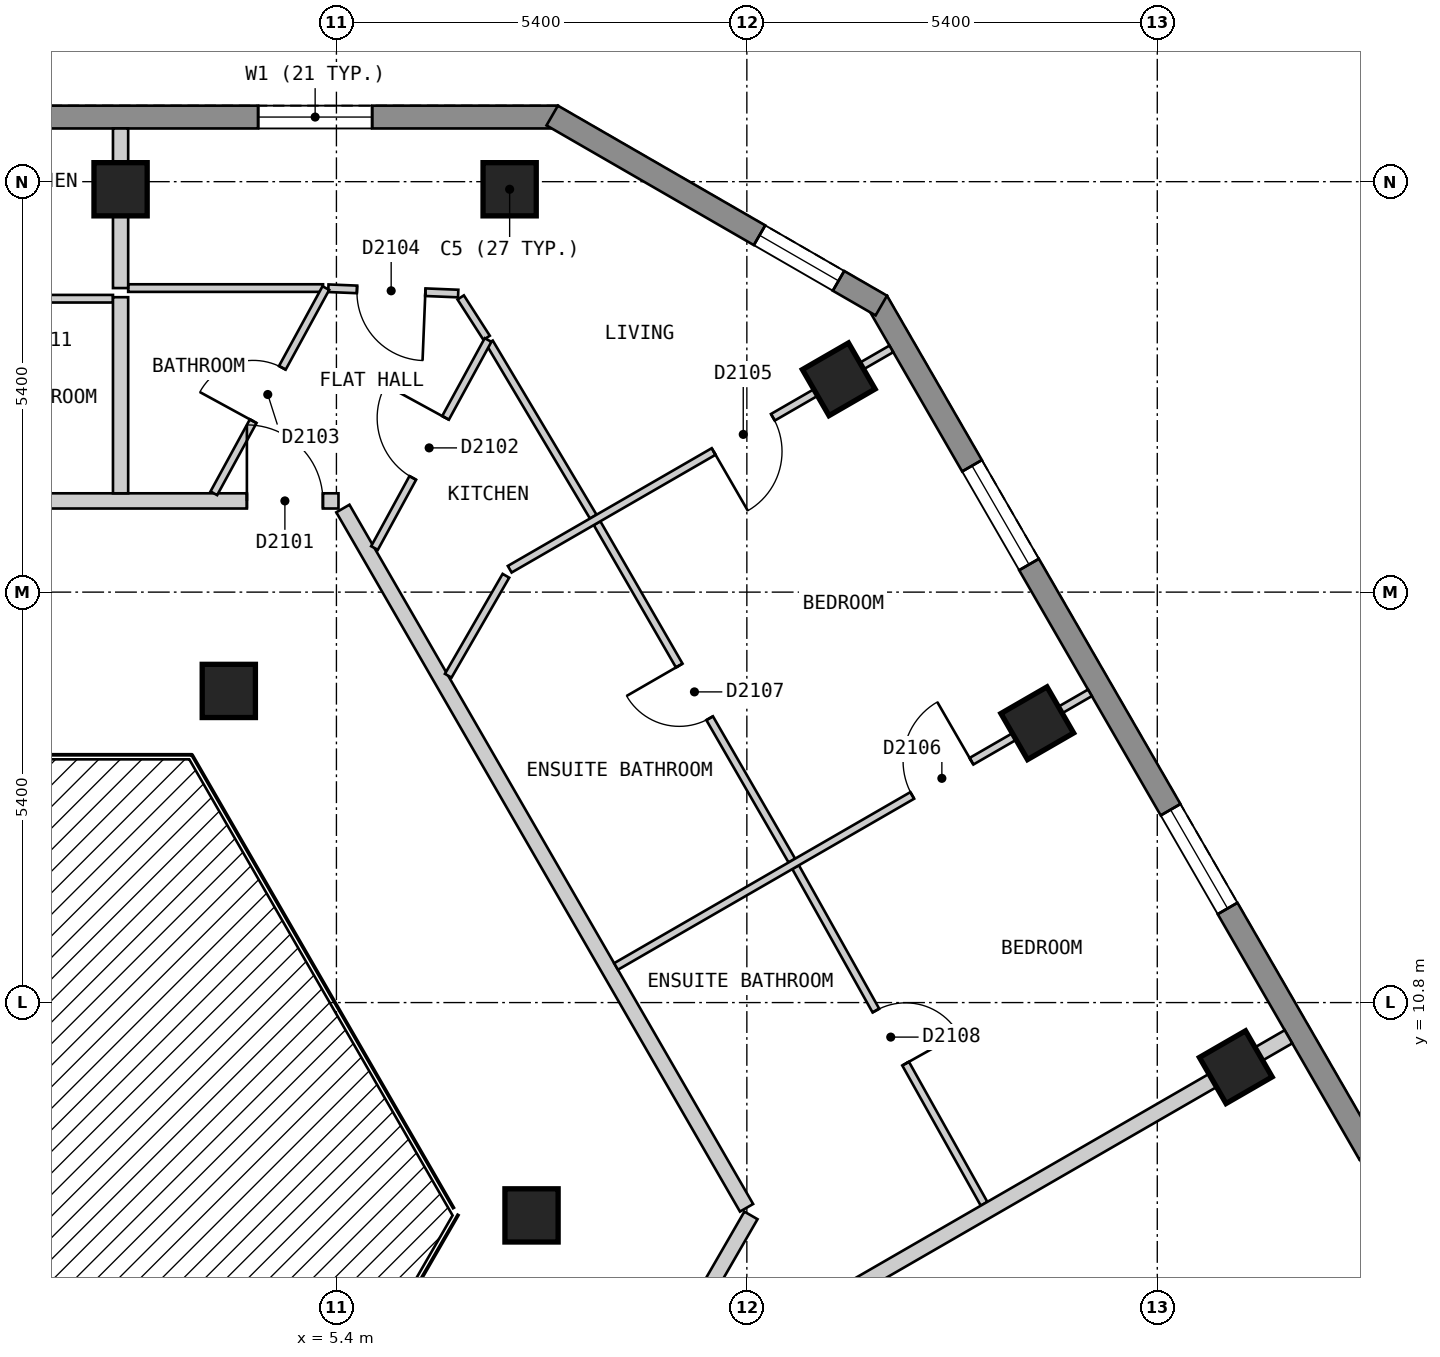
"""IFC4 building model, lengths in metres.
Left out: names, types, materials, properties, quantities, classifications, styles, units other than length and angle.
Written with IfcOpenShell. Run it as: python <this file> out.ifc"""

import sys

from ifc_helpers import new_model, si_unit, direction, frame, frame_2d, origin, origin_2d, place, context, subcontext, project, spatial, polyline, rectangle, outline, extrude, element, fill, save


model = new_model("IFC4")
c1 = context("Model", 3, precision=1e-05, world=origin(), true_north=direction((0.0, 1.0)))
c2 = subcontext(c1, "Body", "Model", "MODEL_VIEW")
j1 = project(units=[si_unit("LENGTHUNIT", "METRE"), si_unit("PLANEANGLEUNIT", "RADIAN")], contexts=[c1])
p1 = place(None, origin())
s1 = spatial("IfcSite", under=j1, at=p1, CompositionType="ELEMENT")
p2 = place(p1, origin())
s2 = spatial("IfcBuilding", under=s1, at=p2, CompositionType="ELEMENT")
p3 = place(p2, frame((0.0, 0.0, 211.8)))
s3 = spatial("IfcBuildingStorey", under=s2, at=p3, CompositionType="ELEMENT", Elevation=211.8)
for number, where, z_axis, x_axis in (
    (1, (7.679, 21.5, 0.0), (0.0, 0.0, 1.0), (-1.0, 0.0, 0.0)),
    (2, (2.56, 21.5, 0.0), (0.0, 0.0, 1.0), (-1.0, 0.0, 0.0)),
    (3, (17.233, 9.95, 0.0), (0.0, 0.0, 1.0), (-0.5, 0.866, 0.0)),
    (4, (14.621, 14.475, 0.0), (0.0, 0.0, 1.0), (-0.5, 0.866, 0.0)),
    (5, (12.009, 19.0, 0.0), (0.0, 0.0, 1.0), (-0.5, 0.866, 0.0)),
    (6, (7.967, 8.0, 0.0), (0.0, 0.0, 1.0), (1.0, 0.0, 0.0)),
    (7, (3.984, 14.9, 0.0), (0.0, 0.0, 1.0), (1.0, 0.0, 0.0)),
):
    element("IfcColumn", number, at=place(p3, frame(where, z_axis=z_axis, x_axis=x_axis)), inside=s3, PredefinedType="COLUMN", context=c2, shape_type="SweptSolid", body=[
        extrude(rectangle(XDim=0.7, YDim=0.7, at=origin_2d()), origin(), (0.0, 0.0, 1.0), 3.0),
    ])
p4 = place(p3, frame((8.314, 22.45, 0.0), z_axis=(0.0, 0.0, 1.0), x_axis=(-1.0, 0.0, 0.0)))
e8 = element("IfcWall", 8, at=p4, inside=s3, PredefinedType="SOLIDWALL", context=c2, shape_type="SweptSolid", body=[
    extrude(outline(polyline([(0.0, -0.15), (16.628, -0.15), (16.548, 0.15), (0.08, 0.15), (0.0, -0.15)])), origin(), (0.0, 0.0, 1.0), 2.7),
])
p5 = place(p4, frame((2.444, 0.0, 0.15)))
e9 = element("IfcOpeningElement", 9, at=p5, cuts=e8, PredefinedType="OPENING", context=c2, shape_type="SweptSolid", body=[
    extrude(rectangle(XDim=1.5, YDim=2.1, at=frame_2d((0.75, 1.05))), frame((0.0, 0.16, 0.0), z_axis=(0.0, -1.0, 0.0), x_axis=(1.0, 0.0, 0.0)), (0.0, 0.0, 1.0), 0.32),
])
p6 = place(p4, frame((7.564, 0.0, 0.15)))
e10 = element("IfcOpeningElement", 10, at=p6, cuts=e8, PredefinedType="OPENING", context=c2, shape_type="SweptSolid", body=[
    extrude(rectangle(XDim=1.5, YDim=2.1, at=frame_2d((0.75, 1.05))), frame((0.0, 0.16, 0.0), z_axis=(0.0, -1.0, 0.0), x_axis=(1.0, 0.0, 0.0)), (0.0, 0.0, 1.0), 0.32),
])
p7 = place(p4, frame((12.683, 0.0, 0.15)))
e11 = element("IfcOpeningElement", 11, at=p7, cuts=e8, PredefinedType="OPENING", context=c2, shape_type="SweptSolid", body=[
    extrude(rectangle(XDim=1.5, YDim=2.1, at=frame_2d((0.75, 1.05))), frame((0.0, 0.16, 0.0), z_axis=(0.0, -1.0, 0.0), x_axis=(1.0, 0.0, 0.0)), (0.0, 0.0, 1.0), 0.32),
])
p8 = place(p3, frame((23.599, 0.825, 0.0), z_axis=(0.0, 0.0, 1.0), x_axis=(-0.500003656944, 0.866023292436, 0.0)))
e12 = element("IfcWall", 12, at=p8, inside=s3, PredefinedType="SOLIDWALL", context=c2, shape_type="SweptSolid", body=[
    extrude(outline(polyline([(0.0, -0.15), (22.17, -0.15), (22.09, 0.15), (0.08, 0.15), (0.0, -0.15)])), origin(), (0.0, 0.0, 1.0), 2.7),
])
p9 = place(p8, frame((2.497, 0.0, 0.15)))
e13 = element("IfcOpeningElement", 13, at=p9, cuts=e12, PredefinedType="OPENING", context=c2, shape_type="SweptSolid", body=[
    extrude(rectangle(XDim=1.5, YDim=2.1, at=frame_2d((0.75, 1.05))), frame((0.0, 0.16, 0.0), z_axis=(0.0, -1.0, 0.0), x_axis=(1.0, 0.0, 0.0)), (0.0, 0.0, 1.0), 0.32),
])
p10 = place(p8, frame((7.723, 0.0, 0.15)))
e14 = element("IfcOpeningElement", 14, at=p10, cuts=e12, PredefinedType="OPENING", context=c2, shape_type="SweptSolid", body=[
    extrude(rectangle(XDim=1.5, YDim=2.1, at=frame_2d((0.75, 1.05))), frame((0.0, 0.16, 0.0), z_axis=(0.0, -1.0, 0.0), x_axis=(1.0, 0.0, 0.0)), (0.0, 0.0, 1.0), 0.32),
])
p11 = place(p8, frame((12.948, 0.0, 0.15)))
e15 = element("IfcOpeningElement", 15, at=p11, cuts=e12, PredefinedType="OPENING", context=c2, shape_type="SweptSolid", body=[
    extrude(rectangle(XDim=1.5, YDim=2.1, at=frame_2d((0.75, 1.05))), frame((0.0, 0.16, 0.0), z_axis=(0.0, -1.0, 0.0), x_axis=(1.0, 0.0, 0.0)), (0.0, 0.0, 1.0), 0.32),
])
p12 = place(p8, frame((18.173, 0.0, 0.15)))
e16 = element("IfcOpeningElement", 16, at=p12, cuts=e12, PredefinedType="OPENING", context=c2, shape_type="SweptSolid", body=[
    extrude(rectangle(XDim=1.5, YDim=2.1, at=frame_2d((0.75, 1.05))), frame((0.0, 0.16, 0.0), z_axis=(0.0, -1.0, 0.0), x_axis=(1.0, 0.0, 0.0)), (0.0, 0.0, 1.0), 0.32),
])
p13 = place(p3, frame((12.569, 19.97, 0.0), z_axis=(0.0, 0.0, 1.0), x_axis=(-0.866022959057, 0.500004234368, 0.0)))
e17 = element("IfcWall", 17, at=p13, inside=s3, PredefinedType="SOLIDWALL", context=c2, shape_type="SweptSolid", body=[
    extrude(outline(polyline([(0.0, -0.15), (5.0, -0.15), (4.92, 0.15), (0.08, 0.15), (0.0, -0.15)])), origin(), (0.0, 0.0, 1.0), 2.7),
])
p14 = place(p13, frame((0.65, 0.0, 0.15)))
e18 = element("IfcOpeningElement", 18, at=p14, cuts=e17, PredefinedType="OPENING", context=c2, shape_type="SweptSolid", body=[
    extrude(rectangle(XDim=1.2, YDim=2.1, at=frame_2d((0.6, 1.05))), frame((0.0, 0.16, 0.0), z_axis=(0.0, -1.0, 0.0), x_axis=(1.0, 0.0, 0.0)), (0.0, 0.0, 1.0), 0.32),
])
p15 = place(p3, frame((5.485, 17.3, 0.0), z_axis=(0.0, 0.0, 1.0), x_axis=(0.499943285704, -0.866058145322, 0.0)))
e19 = element("IfcWall", 19, at=p15, inside=s3, PredefinedType="PARTITIONING", context=c2, shape_type="SweptSolid", body=[
    extrude(rectangle(XDim=10.623, YDim=0.2, at=frame_2d((5.312, 0.0))), origin(), (0.0, 0.0, 1.0), 2.7),
])
p16 = place(p3, frame((-5.312, 17.4, 0.0), z_axis=(0.0, 0.0, 1.0), x_axis=(1.0, 0.0, 0.0)))
e20 = element("IfcWall", 20, at=p16, inside=s3, PredefinedType="PARTITIONING", context=c2, shape_type="SweptSolid", body=[
    extrude(rectangle(XDim=10.739, YDim=0.2, at=frame_2d((5.37, 0.0))), origin(), (0.0, 0.0, 1.0), 2.7),
])
p17 = place(p16, frame((9.534, 0.0, 0.0)))
e21 = element("IfcOpeningElement", 21, at=p17, cuts=e20, PredefinedType="OPENING", context=c2, shape_type="SweptSolid", body=[
    extrude(rectangle(XDim=1.0, YDim=2.1, at=frame_2d((0.5, 1.05))), frame((0.0, 0.11, 0.0), z_axis=(0.0, -1.0, 0.0), x_axis=(1.0, 0.0, 0.0)), (0.0, 0.0, 1.0), 0.22),
])
p18 = place(p16, frame((4.812, 0.0, 0.0)))
e22 = element("IfcOpeningElement", 22, at=p18, cuts=e20, PredefinedType="OPENING", context=c2, shape_type="SweptSolid", body=[
    extrude(rectangle(XDim=1.0, YDim=2.1, at=frame_2d((0.5, 1.05))), frame((0.0, 0.11, 0.0), z_axis=(0.0, -1.0, 0.0), x_axis=(1.0, 0.0, 0.0)), (0.0, 0.0, 1.0), 0.22),
])
p19 = place(p3, frame((9.454, 5.574, 0.0), z_axis=(0.0, 0.0, 1.0), x_axis=(0.499795394297, 0.86614350072, 0.0)))
e23 = element("IfcWall", 23, at=p19, inside=s3, PredefinedType="PARTITIONING", context=c2, shape_type="SweptSolid", body=[
    extrude(rectangle(XDim=2.801, YDim=0.2, at=frame_2d((1.4, 0.0))), origin(), (0.0, 0.0, 1.0), 2.7),
])
p20 = place(p3, frame((7.035, 20.077, 0.0), z_axis=(0.0, 0.0, 1.0), x_axis=(0.540425167977, -0.841392083286, 0.0)))
e24 = element("IfcWall", 24, at=p20, inside=s3, PredefinedType="PARTITIONING", context=c2, shape_type="SweptSolid", body=[
    extrude(rectangle(XDim=0.631, YDim=0.1, at=frame_2d((0.315, 0.0))), origin(), (0.0, 0.0, 1.0), 2.7),
])
p21 = place(p3, frame((7.414, 19.484, 0.0), z_axis=(0.0, 0.0, 1.0), x_axis=(0.511881371655, -0.859056145634, 0.0)))
e25 = element("IfcWall", 25, at=p21, inside=s3, PredefinedType="PARTITIONING", context=c2, shape_type="SweptSolid", body=[
    extrude(rectangle(XDim=2.667, YDim=0.1, at=frame_2d((1.333, 0.0))), origin(), (0.0, 0.0, 1.0), 2.7),
])
p22 = place(p3, frame((8.829, 17.107, 0.0), z_axis=(0.0, 0.0, 1.0), x_axis=(0.500022055211, -0.866012669828, 0.0)))
e26 = element("IfcWall", 26, at=p22, inside=s3, PredefinedType="PARTITIONING", context=c2, shape_type="SweptSolid", body=[
    extrude(rectangle(XDim=5.126, YDim=0.1, at=frame_2d((2.563, 0.0))), origin(), (0.0, 0.0, 1.0), 2.7),
])
p23 = place(p22, frame((2.163, 0.0, 0.0)))
e27 = element("IfcOpeningElement", 27, at=p23, cuts=e26, PredefinedType="OPENING", context=c2, shape_type="SweptSolid", body=[
    extrude(rectangle(XDim=0.8, YDim=2.1, at=frame_2d((0.4, 1.05))), frame((0.0, 0.06, 0.0), z_axis=(0.0, -1.0, 0.0), x_axis=(1.0, 0.0, 0.0)), (0.0, 0.0, 1.0), 0.12),
])
p24 = place(p3, frame((11.441, 12.582, 0.0), z_axis=(0.0, 0.0, 1.0), x_axis=(0.488568218554, -0.872525699231, 0.0)))
e28 = element("IfcWall", 28, at=p24, inside=s3, PredefinedType="PARTITIONING", context=c2, shape_type="SweptSolid", body=[
    extrude(rectangle(XDim=5.076, YDim=0.1, at=frame_2d((2.538, 0.0))), origin(), (0.0, 0.0, 1.0), 2.7),
])
p25 = place(p24, frame((2.163, 0.0, 0.0)))
e29 = element("IfcOpeningElement", 29, at=p25, cuts=e28, PredefinedType="OPENING", context=c2, shape_type="SweptSolid", body=[
    extrude(rectangle(XDim=0.8, YDim=2.1, at=frame_2d((0.4, 1.05))), frame((0.0, 0.06, 0.0), z_axis=(0.0, -1.0, 0.0), x_axis=(1.0, 0.0, 0.0)), (0.0, 0.0, 1.0), 0.12),
])
p26 = place(p3, frame((5.294, 20.198, 0.0), z_axis=(0.0, 0.0, 1.0), x_axis=(0.999159599203, -0.040988965834, 0.0)))
e30 = element("IfcWall", 30, at=p26, inside=s3, PredefinedType="PARTITIONING", context=c2, shape_type="SweptSolid", body=[
    extrude(rectangle(XDim=1.709, YDim=0.1, at=frame_2d((0.855, 0.0))), origin(), (0.0, 0.0, 1.0), 2.7),
])
p27 = place(p26, frame((0.377, 0.0, 0.0)))
e31 = element("IfcOpeningElement", 31, at=p27, cuts=e30, PredefinedType="OPENING", context=c2, shape_type="SweptSolid", body=[
    extrude(rectangle(XDim=0.9, YDim=2.1, at=frame_2d((0.45, 1.05))), frame((0.0, 0.06, 0.0), z_axis=(0.0, -1.0, 0.0), x_axis=(1.0, 0.0, 0.0)), (0.0, 0.0, 1.0), 0.12),
])
p28 = place(p3, frame((-0.716, 20.06, 0.0), z_axis=(0.0, 0.0, 1.0), x_axis=(1.0, 0.0, 0.0)))
e32 = element("IfcWall", 32, at=p28, inside=s3, PredefinedType="PARTITIONING", context=c2, shape_type="SweptSolid", body=[
    extrude(rectangle(XDim=3.176, YDim=0.1, at=frame_2d((1.588, 0.0))), origin(), (0.0, 0.0, 1.0), 2.7),
])
p29 = place(p3, frame((2.66, 20.2, 0.0), z_axis=(0.0, 0.0, 1.0), x_axis=(1.0, 0.0, 0.0)))
e33 = element("IfcWall", 33, at=p29, inside=s3, PredefinedType="PARTITIONING", context=c2, shape_type="SweptSolid", body=[
    extrude(rectangle(XDim=2.564, YDim=0.1, at=frame_2d((1.282, 0.0))), origin(), (0.0, 0.0, 1.0), 2.7),
])
p30 = place(p3, frame((6.871, 15.1, 0.0), z_axis=(0.0, 0.0, 1.0), x_axis=(0.499805980977, 0.866137391745, 0.0)))
e34 = element("IfcWall", 34, at=p30, inside=s3, PredefinedType="PARTITIONING", context=c2, shape_type="SweptSolid", body=[
    extrude(rectangle(XDim=1.518, YDim=0.1, at=frame_2d((0.759, 0.0))), origin(), (0.0, 0.0, 1.0), 2.7),
])
p31 = place(p3, frame((3.787, 17.5, 0.0), z_axis=(0.0, 0.0, 1.0), x_axis=(0.479146828267, 0.877734764585, 0.0)))
e35 = element("IfcWall", 35, at=p31, inside=s3, PredefinedType="PARTITIONING", context=c2, shape_type="SweptSolid", body=[
    extrude(rectangle(XDim=3.076, YDim=0.1, at=frame_2d((1.538, 0.0))), origin(), (0.0, 0.0, 1.0), 2.7),
])
p32 = place(p31, frame((1.081, 0.0, 0.0)))
e36 = element("IfcOpeningElement", 36, at=p32, cuts=e35, PredefinedType="OPENING", context=c2, shape_type="SweptSolid", body=[
    extrude(rectangle(XDim=0.8, YDim=2.1, at=frame_2d((0.4, 1.05))), frame((0.0, 0.06, 0.0), z_axis=(0.0, -1.0, 0.0), x_axis=(1.0, 0.0, 0.0)), (0.0, 0.0, 1.0), 0.12),
])
p33 = place(p3, frame((5.901, 16.78, 0.0), z_axis=(0.0, 0.0, 1.0), x_axis=(0.479148317257, 0.877733951759, 0.0)))
e37 = element("IfcWall", 37, at=p33, inside=s3, PredefinedType="PARTITIONING", context=c2, shape_type="SweptSolid", body=[
    extrude(rectangle(XDim=3.118, YDim=0.1, at=frame_2d((1.559, 0.0))), origin(), (0.0, 0.0, 1.0), 2.7),
])
p34 = place(p33, frame((1.051, 0.0, 0.0)))
e38 = element("IfcOpeningElement", 38, at=p34, cuts=e37, PredefinedType="OPENING", context=c2, shape_type="SweptSolid", body=[
    extrude(rectangle(XDim=0.9, YDim=2.1, at=frame_2d((0.45, 1.05))), frame((0.0, 0.06, 0.0), z_axis=(0.0, -1.0, 0.0), x_axis=(1.0, 0.0, 0.0)), (0.0, 0.0, 1.0), 0.12),
])
p35 = place(p3, frame((9.079, 11.275, 0.0), z_axis=(0.0, 0.0, 1.0), x_axis=(0.866001485781, 0.500041424909, 0.0)))
e39 = element("IfcWall", 39, at=p35, inside=s3, PredefinedType="PARTITIONING", context=c2, shape_type="SweptSolid", body=[
    extrude(rectangle(XDim=7.2, YDim=0.1, at=frame_2d((3.6, 0.0))), origin(), (0.0, 0.0, 1.0), 2.7),
])
p36 = place(p35, frame((4.5, 0.0, 0.0)))
e40 = element("IfcOpeningElement", 40, at=p36, cuts=e39, PredefinedType="OPENING", context=c2, shape_type="SweptSolid", body=[
    extrude(rectangle(XDim=0.9, YDim=2.1, at=frame_2d((0.45, 1.05))), frame((0.0, 0.06, 0.0), z_axis=(0.0, -1.0, 0.0), x_axis=(1.0, 0.0, 0.0)), (0.0, 0.0, 1.0), 0.12),
])
p37 = place(p3, frame((7.68, 16.501, 0.0), z_axis=(0.0, 0.0, 1.0), x_axis=(0.86602149507, 0.500006770031, 0.0)))
e41 = element("IfcWall", 41, at=p37, inside=s3, PredefinedType="PARTITIONING", context=c2, shape_type="SweptSolid", body=[
    extrude(rectangle(XDim=5.798, YDim=0.1, at=frame_2d((2.899, 0.0))), origin(), (0.0, 0.0, 1.0), 2.7),
])
p38 = place(p37, frame((3.098, 0.0, 0.0)))
e42 = element("IfcOpeningElement", 42, at=p38, cuts=e41, PredefinedType="OPENING", context=c2, shape_type="SweptSolid", body=[
    extrude(rectangle(XDim=0.9, YDim=2.1, at=frame_2d((0.45, 1.05))), frame((0.0, 0.06, 0.0), z_axis=(0.0, -1.0, 0.0), x_axis=(1.0, 0.0, 0.0)), (0.0, 0.0, 1.0), 0.12),
])
p39 = place(p3, frame((2.56, 20.08, 0.0), z_axis=(0.0, 0.0, 1.0), x_axis=(0.0, -1.0, 0.0)))
e43 = element("IfcWall", 43, at=p39, inside=s3, PredefinedType="PARTITIONING", context=c2, shape_type="SweptSolid", body=[
    extrude(rectangle(XDim=2.58, YDim=0.2, at=frame_2d((1.29, 0.0))), origin(), (0.0, 0.0, 1.0), 2.7),
])
p40 = place(p3, frame((2.56, 20.2, 0.0), z_axis=(0.0, 0.0, 1.0), x_axis=(0.0, 1.0, 0.0)))
e44 = element("IfcWall", 44, at=p40, inside=s3, PredefinedType="PARTITIONING", context=c2, shape_type="SweptSolid", body=[
    extrude(rectangle(XDim=2.1, YDim=0.2, at=frame_2d((1.05, 0.0))), origin(), (0.0, 0.0, 1.0), 2.7),
])
p41 = place(p3, frame((9.354, 5.401, 0.0), z_axis=(0.0, 0.0, 1.0), x_axis=(0.866018411306, 0.500012111133, 0.0)))
e45 = element("IfcWall", 45, at=p41, inside=s3, PredefinedType="PARTITIONING", context=c2, shape_type="SweptSolid", body=[
    extrude(rectangle(XDim=9.898, YDim=0.2, at=frame_2d((4.949, 0.0))), origin(), (0.0, 0.0, 1.0), 2.7),
])
p42 = place(p5, origin())
e46 = element("IfcWindow", 46, at=p42, inside=s3, PartitioningType="SINGLE_PANEL", PredefinedType="WINDOW", context=c2, shape_type="SweptSolid", body=[
    extrude(rectangle(XDim=1.5, YDim=2.1, at=frame_2d((0.75, 1.05))), frame((0.0, 0.03, 0.0), z_axis=(0.0, -1.0, 0.0), x_axis=(1.0, 0.0, 0.0)), (0.0, 0.0, 1.0), 0.06),
])
fill(e9, e46)
p43 = place(p11, origin())
e47 = element("IfcWindow", 47, at=p43, inside=s3, PartitioningType="SINGLE_PANEL", PredefinedType="WINDOW", context=c2, shape_type="SweptSolid", body=[
    extrude(rectangle(XDim=1.5, YDim=2.1, at=frame_2d((0.75, 1.05))), frame((0.0, 0.03, 0.0), z_axis=(0.0, -1.0, 0.0), x_axis=(1.0, 0.0, 0.0)), (0.0, 0.0, 1.0), 0.06),
])
fill(e15, e47)
p44 = place(p12, origin())
e48 = element("IfcWindow", 48, at=p44, inside=s3, PartitioningType="SINGLE_PANEL", PredefinedType="WINDOW", context=c2, shape_type="SweptSolid", body=[
    extrude(rectangle(XDim=1.5, YDim=2.1, at=frame_2d((0.75, 1.05))), frame((0.0, 0.03, 0.0), z_axis=(0.0, -1.0, 0.0), x_axis=(1.0, 0.0, 0.0)), (0.0, 0.0, 1.0), 0.06),
])
fill(e16, e48)
p45 = place(p14, origin())
e49 = element("IfcWindow", 49, at=p45, inside=s3, PartitioningType="SINGLE_PANEL", PredefinedType="WINDOW", context=c2, shape_type="SweptSolid", body=[
    extrude(rectangle(XDim=1.2, YDim=2.1, at=frame_2d((0.6, 1.05))), frame((0.0, 0.03, 0.0), z_axis=(0.0, -1.0, 0.0), x_axis=(1.0, 0.0, 0.0)), (0.0, 0.0, 1.0), 0.06),
])
fill(e18, e49)
p46 = place(p17, origin())
e50 = element("IfcDoor", 50, at=p46, inside=s3, OperationType="SINGLE_SWING_LEFT", PredefinedType="DOOR", context=c2, shape_type="SweptSolid", body=[
    extrude(rectangle(XDim=1.0, YDim=2.1, at=frame_2d((0.5, 1.05))), frame((0.0, 0.025, 0.0), z_axis=(0.0, -1.0, 0.0), x_axis=(1.0, 0.0, 0.0)), (0.0, 0.0, 1.0), 0.05),
])
fill(e21, e50)
p47 = place(p34, origin())
e51 = element("IfcDoor", 51, at=p47, inside=s3, OperationType="SINGLE_SWING_RIGHT", PredefinedType="DOOR", context=c2, shape_type="SweptSolid", body=[
    extrude(rectangle(XDim=0.9, YDim=2.1, at=frame_2d((0.45, 1.05))), frame((0.0, 0.025, 0.0), z_axis=(0.0, -1.0, 0.0), x_axis=(1.0, 0.0, 0.0)), (0.0, 0.0, 1.0), 0.05),
])
fill(e38, e51)
p48 = place(p32, origin())
e52 = element("IfcDoor", 52, at=p48, inside=s3, OperationType="SINGLE_SWING_LEFT", PredefinedType="DOOR", context=c2, shape_type="SweptSolid", body=[
    extrude(rectangle(XDim=0.8, YDim=2.1, at=frame_2d((0.4, 1.05))), frame((0.0, 0.025, 0.0), z_axis=(0.0, -1.0, 0.0), x_axis=(1.0, 0.0, 0.0)), (0.0, 0.0, 1.0), 0.05),
])
fill(e36, e52)
p49 = place(p27, origin())
e53 = element("IfcDoor", 53, at=p49, inside=s3, OperationType="SINGLE_SWING_RIGHT", PredefinedType="DOOR", context=c2, shape_type="SweptSolid", body=[
    extrude(rectangle(XDim=0.9, YDim=2.1, at=frame_2d((0.45, 1.05))), frame((0.0, 0.025, 0.0), z_axis=(0.0, -1.0, 0.0), x_axis=(1.0, 0.0, 0.0)), (0.0, 0.0, 1.0), 0.05),
])
fill(e31, e53)
p50 = place(p38, origin())
e54 = element("IfcDoor", 54, at=p50, inside=s3, OperationType="SINGLE_SWING_LEFT", PredefinedType="DOOR", context=c2, shape_type="SweptSolid", body=[
    extrude(rectangle(XDim=0.9, YDim=2.1, at=frame_2d((0.45, 1.05))), frame((0.0, 0.025, 0.0), z_axis=(0.0, -1.0, 0.0), x_axis=(1.0, 0.0, 0.0)), (0.0, 0.0, 1.0), 0.05),
])
fill(e42, e54)
p51 = place(p36, origin())
e55 = element("IfcDoor", 55, at=p51, inside=s3, OperationType="SINGLE_SWING_RIGHT", PredefinedType="DOOR", context=c2, shape_type="SweptSolid", body=[
    extrude(rectangle(XDim=0.9, YDim=2.1, at=frame_2d((0.45, 1.05))), frame((0.0, 0.025, 0.0), z_axis=(0.0, -1.0, 0.0), x_axis=(1.0, 0.0, 0.0)), (0.0, 0.0, 1.0), 0.05),
])
fill(e40, e55)
p52 = place(p23, origin())
e56 = element("IfcDoor", 56, at=p52, inside=s3, OperationType="SINGLE_SWING_LEFT", PredefinedType="DOOR", context=c2, shape_type="SweptSolid", body=[
    extrude(rectangle(XDim=0.8, YDim=2.1, at=frame_2d((0.4, 1.05))), frame((0.0, 0.025, 0.0), z_axis=(0.0, -1.0, 0.0), x_axis=(1.0, 0.0, 0.0)), (0.0, 0.0, 1.0), 0.05),
])
fill(e27, e56)
p53 = place(p25, origin())
e57 = element("IfcDoor", 57, at=p53, inside=s3, OperationType="SINGLE_SWING_RIGHT", PredefinedType="DOOR", context=c2, shape_type="SweptSolid", body=[
    extrude(rectangle(XDim=0.8, YDim=2.1, at=frame_2d((0.4, 1.05))), frame((0.0, 0.025, 0.0), z_axis=(0.0, -1.0, 0.0), x_axis=(1.0, 0.0, 0.0)), (0.0, 0.0, 1.0), 0.05),
])
fill(e29, e57)
save(model, sys.argv[1])
